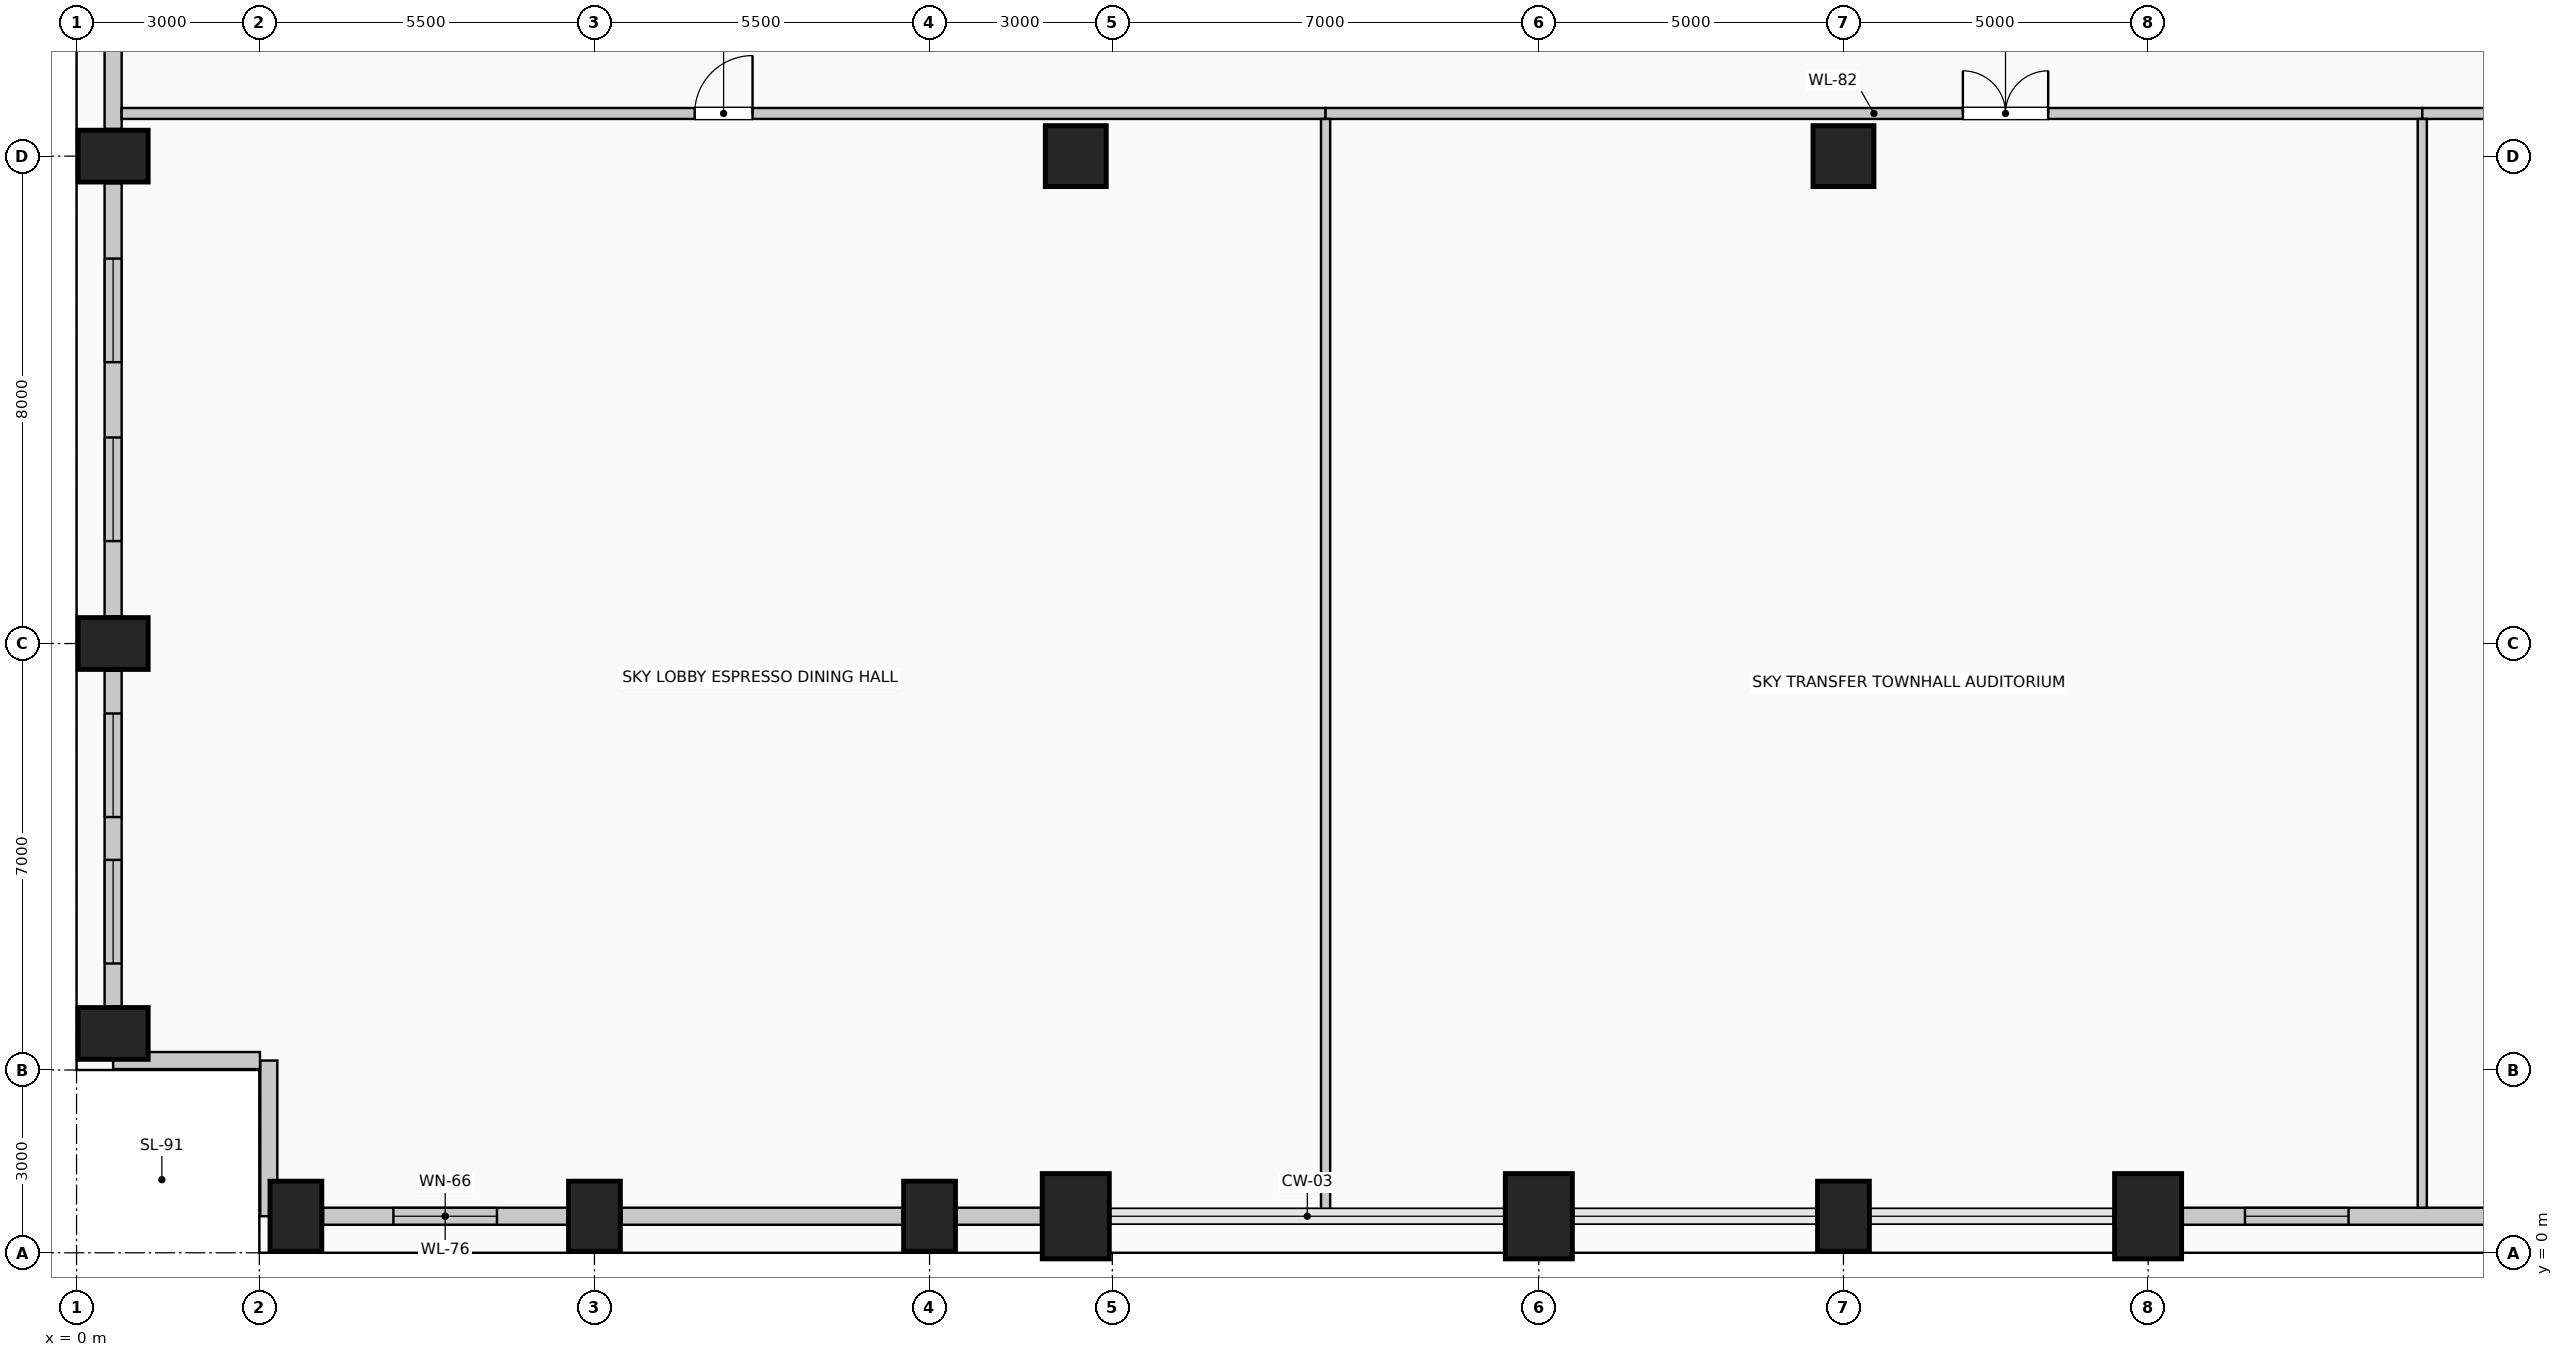
"""IFC4 building model, lengths in metres.
Left out: names, types, materials, properties, quantities, classifications, styles, units other than length and angle.
Written with IfcOpenShell. Run it as: python <this file> out.ifc"""

import sys

from ifc_helpers import new_model, si_unit, direction, frame, frame_2d, origin, origin_2d, place, context, subcontext, project, spatial, rectangle, circle, extrude, element, fill, save


model = new_model("IFC4")
c1 = context("Model", 3, precision=1e-05, world=origin(), true_north=direction((0.0, 1.0)))
c2 = subcontext(c1, "Body", "Model", "MODEL_VIEW")
j1 = project(units=[si_unit("LENGTHUNIT", "METRE"), si_unit("PLANEANGLEUNIT", "RADIAN")], contexts=[c1])
p1 = place(None, origin())
s1 = spatial("IfcSite", under=j1, at=p1, CompositionType="ELEMENT")
p2 = place(p1, origin())
s2 = spatial("IfcBuilding", under=s1, at=p2, CompositionType="ELEMENT")
p3 = place(p2, frame((0.0, 0.0, 87.8)))
s3 = spatial("IfcBuildingStorey", under=s2, at=p3, CompositionType="ELEMENT", Elevation=87.8)
for number, where, z_axis, x_axis in (
    (1, (3.6, 0.6, 0.0), (0.0, 0.0, 1.0), (1.0, 0.0, 0.0)),
    (2, (8.5, 0.6, 0.0), (0.0, 0.0, 1.0), (1.0, 0.0, 0.0)),
    (3, (14.0, 0.6, 0.0), (0.0, 0.0, 1.0), (1.0, 0.0, 0.0)),
):
    element("IfcColumn", number, at=place(p3, frame(where, z_axis=z_axis, x_axis=x_axis)), inside=s3, PredefinedType="COLUMN", context=c2, shape_type="SweptSolid", body=[
        extrude(rectangle(XDim=0.85, YDim=1.15, at=origin_2d()), origin(), (0.0, 0.0, 1.0), 4.8),
    ])
for number, where, z_axis, x_axis in (
    (4, (16.4, 0.6, 0.0), (0.0, 0.0, 1.0), (1.0, 0.0, 0.0)),
    (5, (24.0, 0.6, 0.0), (0.0, 0.0, 1.0), (1.0, 0.0, 0.0)),
):
    element("IfcColumn", number, at=place(p3, frame(where, z_axis=z_axis, x_axis=x_axis)), inside=s3, PredefinedType="COLUMN", context=c2, shape_type="SweptSolid", body=[
        extrude(rectangle(XDim=1.1, YDim=1.4, at=origin_2d()), origin(), (0.0, 0.0, 1.0), 4.8),
    ])
p4 = place(p3, frame((29.0, 0.6, 0.0), z_axis=(0.0, 0.0, 1.0), x_axis=(1.0, 0.0, 0.0)))
e6 = element("IfcColumn", 6, at=p4, inside=s3, PredefinedType="COLUMN", context=c2, shape_type="SweptSolid", body=[
    extrude(rectangle(XDim=0.85, YDim=1.15, at=origin_2d()), origin(), (0.0, 0.0, 1.0), 4.8),
])
p5 = place(p3, frame((34.0, 0.6, 0.0), z_axis=(0.0, 0.0, 1.0), x_axis=(1.0, 0.0, 0.0)))
e7 = element("IfcColumn", 7, at=p5, inside=s3, PredefinedType="COLUMN", context=c2, shape_type="SweptSolid", body=[
    extrude(rectangle(XDim=1.1, YDim=1.4, at=origin_2d()), origin(), (0.0, 0.0, 1.0), 4.8),
])
for number, where, z_axis, x_axis in (
    (8, (0.6, 3.6, 0.0), (0.0, 0.0, 1.0), (0.0, 1.0, 0.0)),
    (9, (0.6, 10.0, 0.0), (0.0, 0.0, 1.0), (0.0, 1.0, 0.0)),
    (10, (0.6, 18.0, 0.0), (0.0, 0.0, 1.0), (0.0, 1.0, 0.0)),
):
    element("IfcColumn", number, at=place(p3, frame(where, z_axis=z_axis, x_axis=x_axis)), inside=s3, PredefinedType="COLUMN", context=c2, shape_type="SweptSolid", body=[
        extrude(rectangle(XDim=0.85, YDim=1.15, at=origin_2d()), origin(), (0.0, 0.0, 1.0), 4.8),
    ])
for number, where, z_axis, x_axis in (
    (11, (16.4, 18.0, 0.0), (0.0, 0.0, 1.0), (1.0, 0.0, 0.0)),
    (12, (29.0, 18.0, 0.0), (0.0, 0.0, 1.0), (1.0, 0.0, 0.0)),
):
    element("IfcColumn", number, at=place(p3, frame(where, z_axis=z_axis, x_axis=x_axis)), inside=s3, PredefinedType="COLUMN", context=c2, shape_type="SweptSolid", body=[
        extrude(circle(Radius=0.5, at=origin_2d()), origin(), (0.0, 0.0, 1.0), 4.8),
    ])
p6 = place(p3, frame((8.055, 0.6, 0.0), z_axis=(0.0, 0.0, 1.0), x_axis=(-1.0, 0.0, 0.0)))
e13 = element("IfcWall", 13, at=p6, inside=s3, PredefinedType="SOLIDWALL", context=c2, shape_type="SweptSolid", body=[
    extrude(rectangle(XDim=4.01, YDim=0.28, at=frame_2d((2.005, 0.0))), origin(), (0.0, 0.0, 1.0), 3.675),
])
p7 = place(p6, frame((1.155, 0.0, 0.5)))
e14 = element("IfcOpeningElement", 14, at=p7, cuts=e13, PredefinedType="OPENING", context=c2, shape_type="SweptSolid", body=[
    extrude(rectangle(XDim=1.7, YDim=1.95, at=frame_2d((0.85, 0.975))), frame((0.0, 0.15, 0.0), z_axis=(0.0, -1.0, 0.0), x_axis=(1.0, 0.0, 0.0)), (0.0, 0.0, 1.0), 0.3),
])
p8 = place(p3, frame((13.555, 0.6, 0.0), z_axis=(0.0, 0.0, 1.0), x_axis=(-1.0, 0.0, 0.0)))
e15 = element("IfcWall", 15, at=p8, inside=s3, PredefinedType="SOLIDWALL", context=c2, shape_type="SweptSolid", body=[
    extrude(rectangle(XDim=4.61, YDim=0.28, at=frame_2d((2.305, 0.0))), origin(), (0.0, 0.0, 1.0), 3.675),
])
p9 = place(p3, frame((15.83, 0.6, 0.0), z_axis=(0.0, 0.0, 1.0), x_axis=(-1.0, 0.0, 0.0)))
e16 = element("IfcWall", 16, at=p9, inside=s3, PredefinedType="SOLIDWALL", context=c2, shape_type="SweptSolid", body=[
    extrude(rectangle(XDim=1.385, YDim=0.28, at=frame_2d((0.692, 0.0))), origin(), (0.0, 0.0, 1.0), 3.675),
])
p10 = place(p3, frame((41.03, 0.6, 0.0), z_axis=(0.0, 0.0, 1.0), x_axis=(-1.0, 0.0, 0.0)))
e17 = element("IfcWall", 17, at=p10, inside=s3, PredefinedType="SOLIDWALL", context=c2, shape_type="SweptSolid", body=[
    extrude(rectangle(XDim=6.46, YDim=0.28, at=frame_2d((3.23, 0.0))), origin(), (0.0, 0.0, 1.0), 3.675),
])
p11 = place(p10, frame((3.74, 0.0, 0.5)))
e18 = element("IfcOpeningElement", 18, at=p11, cuts=e17, PredefinedType="OPENING", context=c2, shape_type="SweptSolid", body=[
    extrude(rectangle(XDim=1.7, YDim=1.95, at=frame_2d((0.85, 0.975))), frame((0.0, 0.15, 0.0), z_axis=(0.0, -1.0, 0.0), x_axis=(1.0, 0.0, 0.0)), (0.0, 0.0, 1.0), 0.3),
])
p12 = place(p3, frame((0.6, 4.045, 0.0), z_axis=(0.0, 0.0, 1.0), x_axis=(0.0, 1.0, 0.0)))
e19 = element("IfcWall", 19, at=p12, inside=s3, PredefinedType="SOLIDWALL", context=c2, shape_type="SweptSolid", body=[
    extrude(rectangle(XDim=5.51, YDim=0.28, at=frame_2d((2.755, 0.0))), origin(), (0.0, 0.0, 1.0), 3.675),
])
p13 = place(p12, frame((0.703, 0.0, 0.5)))
e20 = element("IfcOpeningElement", 20, at=p13, cuts=e19, PredefinedType="OPENING", context=c2, shape_type="SweptSolid", body=[
    extrude(rectangle(XDim=1.7, YDim=1.95, at=frame_2d((0.85, 0.975))), frame((0.0, 0.15, 0.0), z_axis=(0.0, -1.0, 0.0), x_axis=(1.0, 0.0, 0.0)), (0.0, 0.0, 1.0), 0.3),
])
p14 = place(p12, frame((3.107, 0.0, 0.5)))
e21 = element("IfcOpeningElement", 21, at=p14, cuts=e19, PredefinedType="OPENING", context=c2, shape_type="SweptSolid", body=[
    extrude(rectangle(XDim=1.7, YDim=1.95, at=frame_2d((0.85, 0.975))), frame((0.0, 0.15, 0.0), z_axis=(0.0, -1.0, 0.0), x_axis=(1.0, 0.0, 0.0)), (0.0, 0.0, 1.0), 0.3),
])
p15 = place(p3, frame((0.6, 10.445, 0.0), z_axis=(0.0, 0.0, 1.0), x_axis=(0.0, 1.0, 0.0)))
e22 = element("IfcWall", 22, at=p15, inside=s3, PredefinedType="SOLIDWALL", context=c2, shape_type="SweptSolid", body=[
    extrude(rectangle(XDim=7.11, YDim=0.28, at=frame_2d((3.555, 0.0))), origin(), (0.0, 0.0, 1.0), 3.675),
])
p16 = place(p15, frame((1.237, 0.0, 0.5)))
e23 = element("IfcOpeningElement", 23, at=p16, cuts=e22, PredefinedType="OPENING", context=c2, shape_type="SweptSolid", body=[
    extrude(rectangle(XDim=1.7, YDim=1.95, at=frame_2d((0.85, 0.975))), frame((0.0, 0.15, 0.0), z_axis=(0.0, -1.0, 0.0), x_axis=(1.0, 0.0, 0.0)), (0.0, 0.0, 1.0), 0.3),
])
p17 = place(p15, frame((4.173, 0.0, 0.5)))
e24 = element("IfcOpeningElement", 24, at=p17, cuts=e22, PredefinedType="OPENING", context=c2, shape_type="SweptSolid", body=[
    extrude(rectangle(XDim=1.7, YDim=1.95, at=frame_2d((0.85, 0.975))), frame((0.0, 0.15, 0.0), z_axis=(0.0, -1.0, 0.0), x_axis=(1.0, 0.0, 0.0)), (0.0, 0.0, 1.0), 0.3),
])
p18 = place(p3, frame((0.6, 18.445, 0.0), z_axis=(0.0, 0.0, 1.0), x_axis=(0.0, 1.0, 0.0)))
e25 = element("IfcWall", 25, at=p18, inside=s3, PredefinedType="SOLIDWALL", context=c2, shape_type="SweptSolid", body=[
    extrude(rectangle(XDim=7.11, YDim=0.28, at=frame_2d((3.555, 0.0))), origin(), (0.0, 0.0, 1.0), 3.675),
])
p19 = place(p3, frame((3.155, 0.6, 0.0), z_axis=(0.0, 0.0, 1.0), x_axis=(0.0, 1.0, 0.0)))
e26 = element("IfcWall", 26, at=p19, inside=s3, PredefinedType="SOLIDWALL", context=c2, shape_type="SweptSolid", body=[
    extrude(rectangle(XDim=2.555, YDim=0.28, at=frame_2d((1.277, 0.0))), origin(), (0.0, 0.0, 1.0), 4.525),
])
p20 = place(p3, frame((3.01, 3.155, 0.0), z_axis=(0.0, 0.0, 1.0), x_axis=(-1.0, 0.0, 0.0)))
e27 = element("IfcWall", 27, at=p20, inside=s3, PredefinedType="SOLIDWALL", context=c2, shape_type="SweptSolid", body=[
    extrude(rectangle(XDim=2.41, YDim=0.28, at=frame_2d((1.205, 0.0))), origin(), (0.0, 0.0, 1.0), 4.525),
])
p21 = place(p3, frame((0.74, 18.7, 0.0), z_axis=(0.0, 0.0, 1.0), x_axis=(1.0, 0.0, 0.0)))
e28 = element("IfcWall", 28, at=p21, inside=s3, PredefinedType="PARTITIONING", context=c2, shape_type="SweptSolid", body=[
    extrude(rectangle(XDim=19.76, YDim=0.18, at=frame_2d((9.88, 0.0))), origin(), (0.0, 0.0, 1.0), 4.525),
])
p22 = place(p21, frame((9.405, 0.0, 0.0)))
e29 = element("IfcOpeningElement", 29, at=p22, cuts=e28, PredefinedType="OPENING", context=c2, shape_type="SweptSolid", body=[
    extrude(rectangle(XDim=0.95, YDim=2.15, at=frame_2d((0.475, 1.075))), frame((0.0, 0.1, 0.0), z_axis=(0.0, -1.0, 0.0), x_axis=(1.0, 0.0, 0.0)), (0.0, 0.0, 1.0), 0.2),
])
p23 = place(p3, frame((20.5, 18.7, 0.0), z_axis=(0.0, 0.0, 1.0), x_axis=(1.0, 0.0, 0.0)))
e30 = element("IfcWall", 30, at=p23, inside=s3, PredefinedType="PARTITIONING", context=c2, shape_type="SweptSolid", body=[
    extrude(rectangle(XDim=18.0, YDim=0.18, at=frame_2d((9.0, 0.0))), origin(), (0.0, 0.0, 1.0), 4.525),
])
p24 = place(p23, frame((10.46, 0.0, 0.0)))
e31 = element("IfcOpeningElement", 31, at=p24, cuts=e30, PredefinedType="OPENING", context=c2, shape_type="SweptSolid", body=[
    extrude(rectangle(XDim=1.4, YDim=2.2, at=frame_2d((0.7, 1.1))), frame((0.0, 0.1, 0.0), z_axis=(0.0, -1.0, 0.0), x_axis=(1.0, 0.0, 0.0)), (0.0, 0.0, 1.0), 0.2),
])
p25 = place(p3, frame((38.5, 18.7, 0.0), z_axis=(0.0, 0.0, 1.0), x_axis=(1.0, 0.0, 0.0)))
e32 = element("IfcWall", 32, at=p25, inside=s3, PredefinedType="PARTITIONING", context=c2, shape_type="SweptSolid", body=[
    extrude(rectangle(XDim=15.3, YDim=0.18, at=frame_2d((7.65, 0.0))), origin(), (0.0, 0.0, 1.0), 4.525),
])
p26 = place(p25, frame((7.175, 0.0, 0.0)))
e33 = element("IfcOpeningElement", 33, at=p26, cuts=e32, PredefinedType="OPENING", context=c2, shape_type="SweptSolid", body=[
    extrude(rectangle(XDim=0.95, YDim=2.15, at=frame_2d((0.475, 1.075))), frame((0.0, 0.1, 0.0), z_axis=(0.0, -1.0, 0.0), x_axis=(1.0, 0.0, 0.0)), (0.0, 0.0, 1.0), 0.2),
])
p27 = place(p3, frame((20.5, 0.6, 0.0), z_axis=(0.0, 0.0, 1.0), x_axis=(0.0, 1.0, 0.0)))
e34 = element("IfcWall", 34, at=p27, inside=s3, PredefinedType="PARTITIONING", context=c2, shape_type="SweptSolid", body=[
    extrude(rectangle(XDim=18.01, YDim=0.15, at=frame_2d((9.005, 0.0))), origin(), (0.0, 0.0, 1.0), 4.525),
])
p28 = place(p3, frame((38.5, 0.74, 0.0), z_axis=(0.0, 0.0, 1.0), x_axis=(0.0, 1.0, 0.0)))
e35 = element("IfcWall", 35, at=p28, inside=s3, PredefinedType="PARTITIONING", context=c2, shape_type="SweptSolid", body=[
    extrude(rectangle(XDim=17.87, YDim=0.15, at=frame_2d((8.935, 0.0))), origin(), (0.0, 0.0, 1.0), 4.525),
])
p29 = place(p7, origin())
e36 = element("IfcWindow", 36, at=p29, inside=s3, PartitioningType="SINGLE_PANEL", PredefinedType="WINDOW", context=c2, shape_type="SweptSolid", body=[
    extrude(rectangle(XDim=1.7, YDim=1.95, at=frame_2d((0.85, 0.975))), frame((0.0, 0.03, 0.0), z_axis=(0.0, -1.0, 0.0), x_axis=(1.0, 0.0, 0.0)), (0.0, 0.0, 1.0), 0.06),
])
fill(e14, e36)
p30 = place(p11, origin())
e37 = element("IfcWindow", 37, at=p30, inside=s3, PartitioningType="SINGLE_PANEL", PredefinedType="WINDOW", context=c2, shape_type="SweptSolid", body=[
    extrude(rectangle(XDim=1.7, YDim=1.95, at=frame_2d((0.85, 0.975))), frame((0.0, 0.03, 0.0), z_axis=(0.0, -1.0, 0.0), x_axis=(1.0, 0.0, 0.0)), (0.0, 0.0, 1.0), 0.06),
])
fill(e18, e37)
p31 = place(p13, origin())
e38 = element("IfcWindow", 38, at=p31, inside=s3, PartitioningType="SINGLE_PANEL", PredefinedType="WINDOW", context=c2, shape_type="SweptSolid", body=[
    extrude(rectangle(XDim=1.7, YDim=1.95, at=frame_2d((0.85, 0.975))), frame((0.0, 0.03, 0.0), z_axis=(0.0, -1.0, 0.0), x_axis=(1.0, 0.0, 0.0)), (0.0, 0.0, 1.0), 0.06),
])
fill(e20, e38)
p32 = place(p14, origin())
e39 = element("IfcWindow", 39, at=p32, inside=s3, PartitioningType="SINGLE_PANEL", PredefinedType="WINDOW", context=c2, shape_type="SweptSolid", body=[
    extrude(rectangle(XDim=1.7, YDim=1.95, at=frame_2d((0.85, 0.975))), frame((0.0, 0.03, 0.0), z_axis=(0.0, -1.0, 0.0), x_axis=(1.0, 0.0, 0.0)), (0.0, 0.0, 1.0), 0.06),
])
fill(e21, e39)
p33 = place(p16, origin())
e40 = element("IfcWindow", 40, at=p33, inside=s3, PartitioningType="SINGLE_PANEL", PredefinedType="WINDOW", context=c2, shape_type="SweptSolid", body=[
    extrude(rectangle(XDim=1.7, YDim=1.95, at=frame_2d((0.85, 0.975))), frame((0.0, 0.03, 0.0), z_axis=(0.0, -1.0, 0.0), x_axis=(1.0, 0.0, 0.0)), (0.0, 0.0, 1.0), 0.06),
])
fill(e23, e40)
p34 = place(p17, origin())
e41 = element("IfcWindow", 41, at=p34, inside=s3, PartitioningType="SINGLE_PANEL", PredefinedType="WINDOW", context=c2, shape_type="SweptSolid", body=[
    extrude(rectangle(XDim=1.7, YDim=1.95, at=frame_2d((0.85, 0.975))), frame((0.0, 0.03, 0.0), z_axis=(0.0, -1.0, 0.0), x_axis=(1.0, 0.0, 0.0)), (0.0, 0.0, 1.0), 0.06),
])
fill(e24, e41)
p35 = place(p22, origin())
e42 = element("IfcDoor", 42, at=p35, inside=s3, OperationType="SINGLE_SWING_RIGHT", PredefinedType="DOOR", context=c2, shape_type="SweptSolid", body=[
    extrude(rectangle(XDim=0.95, YDim=2.15, at=frame_2d((0.475, 1.075))), frame((0.0, 0.025, 0.0), z_axis=(0.0, -1.0, 0.0), x_axis=(1.0, 0.0, 0.0)), (0.0, 0.0, 1.0), 0.05),
])
fill(e29, e42)
p36 = place(p24, origin())
e43 = element("IfcDoor", 43, at=p36, inside=s3, OperationType="DOUBLE_DOOR_SINGLE_SWING", PredefinedType="DOOR", context=c2, shape_type="SweptSolid", body=[
    extrude(rectangle(XDim=1.4, YDim=2.2, at=frame_2d((0.7, 1.1))), frame((0.0, 0.025, 0.0), z_axis=(0.0, -1.0, 0.0), x_axis=(1.0, 0.0, 0.0)), (0.0, 0.0, 1.0), 0.05),
])
fill(e31, e43)
save(model, sys.argv[1])
